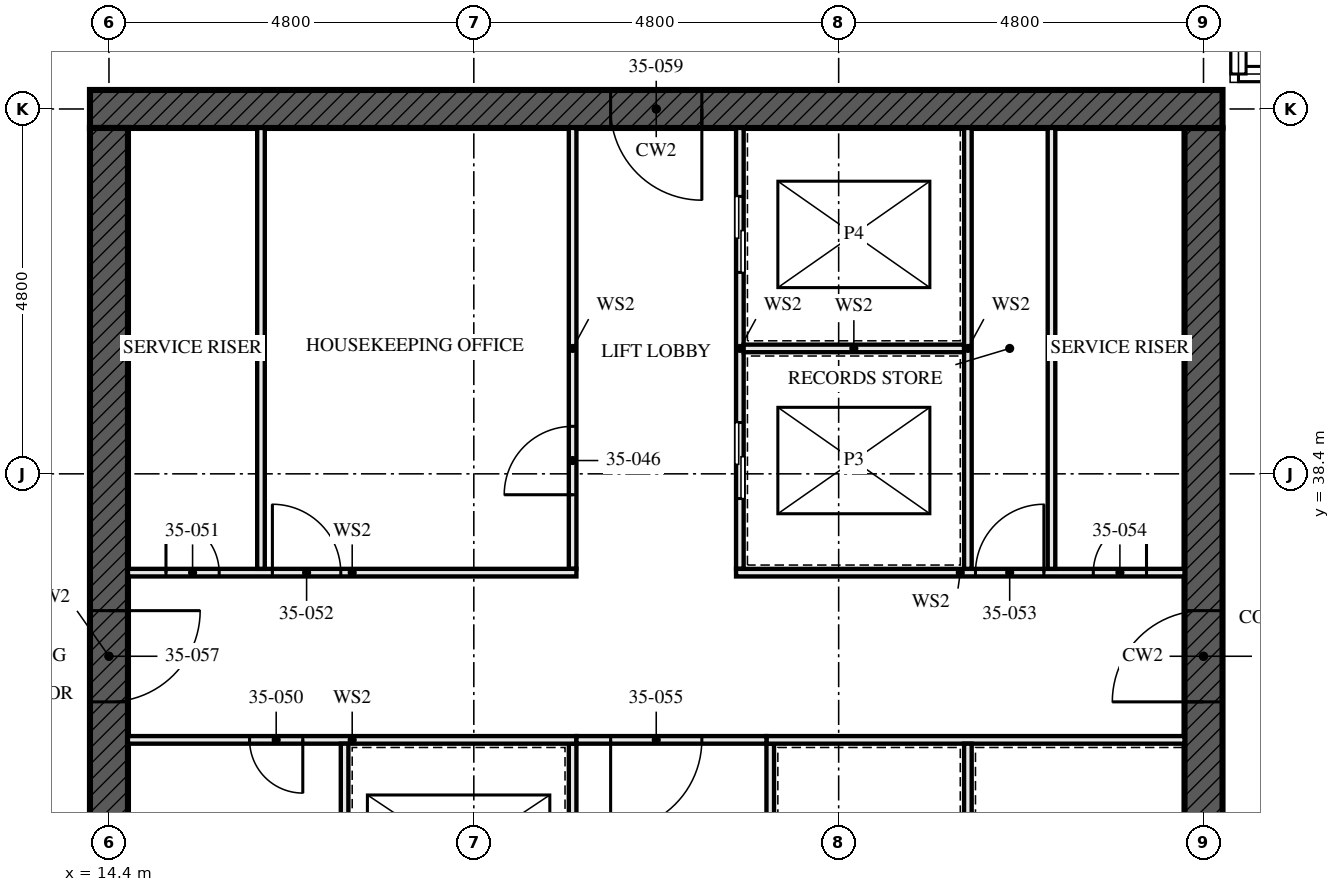
"""IFC4 building model, lengths in metres.
Left out: names, types, materials, properties, quantities, classifications, styles, units other than length and angle.
Written with IfcOpenShell. Run it as: python <this file> out.ifc"""

import sys

from ifc_helpers import new_model, si_unit, direction, frame, frame_2d, origin, place, context, subcontext, project, spatial, rectangle, extrude, element, fill, save


model = new_model("IFC4")
c1 = context("Model", 3, precision=1e-05, world=origin(), true_north=direction((0.0, 1.0)))
c2 = subcontext(c1, "Body", "Model", "MODEL_VIEW")
j1 = project(units=[si_unit("LENGTHUNIT", "METRE"), si_unit("PLANEANGLEUNIT", "RADIAN")], contexts=[c1])
p1 = place(None, origin())
s1 = spatial("IfcSite", under=j1, at=p1, CompositionType="ELEMENT")
p2 = place(p1, origin())
s2 = spatial("IfcBuilding", under=s1, at=p2, CompositionType="ELEMENT")
p3 = place(p2, frame((0.0, 0.0, 129.5)))
s3 = spatial("IfcBuildingStorey", under=s2, at=p3, CompositionType="ELEMENT", Elevation=129.5)
p4 = place(p3, frame((29.05, 43.2, -0.17), z_axis=(0.0, 0.0, 1.0), x_axis=(-1.0, 0.0, 0.0)))
e1 = element("IfcWall", 1, at=p4, inside=s3, PredefinedType="SHEAR", context=c2, shape_type="SweptSolid", body=[
    extrude(rectangle(XDim=14.9, YDim=0.5, at=frame_2d((7.45, 0.0))), origin(), (0.0, 0.0, 1.0), 3.5),
])
p5 = place(p4, frame((6.85, 0.0, 0.17)))
e2 = element("IfcOpeningElement", 2, at=p5, cuts=e1, PredefinedType="OPENING", context=c2, shape_type="SweptSolid", body=[
    extrude(rectangle(XDim=1.2, YDim=2.1, at=frame_2d((0.6, 1.05))), frame((0.0, 0.26, 0.0), z_axis=(0.0, -1.0, 0.0), x_axis=(1.0, 0.0, 0.0)), (0.0, 0.0, 1.0), 0.521),
])
p6 = place(p3, frame((14.4, 42.95, -0.17), z_axis=(0.0, 0.0, 1.0), x_axis=(0.0, -1.0, 0.0)))
e3 = element("IfcWall", 3, at=p6, inside=s3, PredefinedType="SHEAR", context=c2, shape_type="SweptSolid", body=[
    extrude(rectangle(XDim=13.9, YDim=0.5, at=frame_2d((6.95, 0.0))), origin(), (0.0, 0.0, 1.0), 3.5),
])
p7 = place(p6, frame((6.35, 0.0, 0.17)))
e4 = element("IfcOpeningElement", 4, at=p7, cuts=e3, PredefinedType="OPENING", context=c2, shape_type="SweptSolid", body=[
    extrude(rectangle(XDim=1.2, YDim=2.1, at=frame_2d((0.6, 1.05))), frame((0.0, 0.26, 0.0), z_axis=(0.0, -1.0, 0.0), x_axis=(1.0, 0.0, 0.0)), (0.0, 0.0, 1.0), 0.521),
])
p8 = place(p3, frame((28.8, 29.05, -0.17), z_axis=(0.0, 0.0, 1.0), x_axis=(0.0, 1.0, 0.0)))
e5 = element("IfcWall", 5, at=p8, inside=s3, PredefinedType="SHEAR", context=c2, shape_type="SweptSolid", body=[
    extrude(rectangle(XDim=13.9, YDim=0.5, at=frame_2d((6.95, 0.0))), origin(), (0.0, 0.0, 1.0), 3.5),
])
p9 = place(p8, frame((6.35, 0.0, 0.17)))
e6 = element("IfcOpeningElement", 6, at=p9, cuts=e5, PredefinedType="OPENING", context=c2, shape_type="SweptSolid", body=[
    extrude(rectangle(XDim=1.2, YDim=2.1, at=frame_2d((0.6, 1.05))), frame((0.0, 0.26, 0.0), z_axis=(0.0, -1.0, 0.0), x_axis=(1.0, 0.0, 0.0)), (0.0, 0.0, 1.0), 0.521),
])
for number, where, z_axis, x_axis in (
    (7, (16.4, 37.15, 0.0), (0.0, 0.0, 1.0), (0.0, 1.0, 0.0)),
    (8, (26.8, 37.15, 0.0), (0.0, 0.0, 1.0), (0.0, 1.0, 0.0)),
):
    element("IfcWall", number, at=place(p3, frame(where, z_axis=z_axis, x_axis=x_axis)), inside=s3, PredefinedType="SOLIDWALL", context=c2, shape_type="SweptSolid", body=[
        extrude(rectangle(XDim=5.8, YDim=0.1, at=frame_2d((2.9, 0.0))), origin(), (0.0, 0.0, 1.0), 3.33),
    ])
p10 = place(p3, frame((20.5, 29.05, 0.0), z_axis=(0.0, 0.0, 1.0), x_axis=(0.0, 1.0, 0.0)))
e9 = element("IfcWall", 9, at=p10, inside=s3, PredefinedType="SOLIDWALL", context=c2, shape_type="SweptSolid", body=[
    extrude(rectangle(XDim=5.8, YDim=0.1, at=frame_2d((2.9, 0.0))), origin(), (0.0, 0.0, 1.0), 3.33),
])
p11 = place(p10, frame((0.8, 0.0, 0.0)))
e10 = element("IfcOpeningElement", 10, at=p11, cuts=e9, PredefinedType="OPENING", context=c2, shape_type="SweptSolid", body=[
    extrude(rectangle(XDim=1.1, YDim=2.3, at=frame_2d((0.55, 1.15))), frame((0.0, 0.061, 0.0), z_axis=(0.0, -1.0, 0.0), x_axis=(1.0, 0.0, 0.0)), (0.0, 0.0, 1.0), 0.121),
])
p12 = place(p10, frame((3.775, 0.0, 0.0)))
e11 = element("IfcOpeningElement", 11, at=p12, cuts=e9, PredefinedType="OPENING", context=c2, shape_type="SweptSolid", body=[
    extrude(rectangle(XDim=1.1, YDim=2.3, at=frame_2d((0.55, 1.15))), frame((0.0, 0.061, 0.0), z_axis=(0.0, -1.0, 0.0), x_axis=(1.0, 0.0, 0.0)), (0.0, 0.0, 1.0), 0.121),
])
p13 = place(p3, frame((20.5, 37.15, 0.0), z_axis=(0.0, 0.0, 1.0), x_axis=(0.0, 1.0, 0.0)))
e12 = element("IfcWall", 12, at=p13, inside=s3, PredefinedType="SOLIDWALL", context=c2, shape_type="SweptSolid", body=[
    extrude(rectangle(XDim=5.8, YDim=0.1, at=frame_2d((2.9, 0.0))), origin(), (0.0, 0.0, 1.0), 3.33),
])
p14 = place(p13, frame((0.975, 0.0, 0.0)))
e13 = element("IfcOpeningElement", 13, at=p14, cuts=e12, PredefinedType="OPENING", context=c2, shape_type="SweptSolid", body=[
    extrude(rectangle(XDim=0.9, YDim=2.1, at=frame_2d((0.45, 1.05))), frame((0.0, 0.061, 0.0), z_axis=(0.0, -1.0, 0.0), x_axis=(1.0, 0.0, 0.0)), (0.0, 0.0, 1.0), 0.121),
])
p15 = place(p3, frame((22.7, 37.15, 0.0), z_axis=(0.0, 0.0, 1.0), x_axis=(0.0, 1.0, 0.0)))
e14 = element("IfcWall", 14, at=p15, inside=s3, PredefinedType="SOLIDWALL", context=c2, shape_type="SweptSolid", body=[
    extrude(rectangle(XDim=5.8, YDim=0.1, at=frame_2d((2.9, 0.0))), origin(), (0.0, 0.0, 1.0), 3.33),
])
p16 = place(p15, frame((0.925, 0.0, 0.0)))
e15 = element("IfcOpeningElement", 15, at=p16, cuts=e14, PredefinedType="OPENING", context=c2, shape_type="SweptSolid", body=[
    extrude(rectangle(XDim=1.0, YDim=2.1, at=frame_2d((0.5, 1.05))), frame((0.0, 0.061, 0.0), z_axis=(0.0, -1.0, 0.0), x_axis=(1.0, 0.0, 0.0)), (0.0, 0.0, 1.0), 0.121),
])
p17 = place(p15, frame((3.9, 0.0, 0.0)))
e16 = element("IfcOpeningElement", 16, at=p17, cuts=e14, PredefinedType="OPENING", context=c2, shape_type="SweptSolid", body=[
    extrude(rectangle(XDim=1.0, YDim=2.1, at=frame_2d((0.5, 1.05))), frame((0.0, 0.061, 0.0), z_axis=(0.0, -1.0, 0.0), x_axis=(1.0, 0.0, 0.0)), (0.0, 0.0, 1.0), 0.121),
])
p18 = place(p3, frame((23.1, 29.05, 0.0), z_axis=(0.0, 0.0, 1.0), x_axis=(0.0, 1.0, 0.0)))
e17 = element("IfcWall", 17, at=p18, inside=s3, PredefinedType="SOLIDWALL", context=c2, shape_type="SweptSolid", body=[
    extrude(rectangle(XDim=5.8, YDim=0.1, at=frame_2d((2.9, 0.0))), origin(), (0.0, 0.0, 1.0), 3.33),
])
p19 = place(p18, frame((1.0, 0.0, 0.0)))
e18 = element("IfcOpeningElement", 18, at=p19, cuts=e17, PredefinedType="OPENING", context=c2, shape_type="SweptSolid", body=[
    extrude(rectangle(XDim=0.7, YDim=2.1, at=frame_2d((0.35, 1.05))), frame((0.0, 0.061, 0.0), z_axis=(0.0, -1.0, 0.0), x_axis=(1.0, 0.0, 0.0)), (0.0, 0.0, 1.0), 0.121),
])
p20 = place(p3, frame((14.65, 34.9, 0.0), z_axis=(0.0, 0.0, 1.0), x_axis=(1.0, 0.0, 0.0)))
e19 = element("IfcWall", 19, at=p20, inside=s3, PredefinedType="SOLIDWALL", context=c2, shape_type="SweptSolid", body=[
    extrude(rectangle(XDim=5.9, YDim=0.1, at=frame_2d((2.95, 0.0))), origin(), (0.0, 0.0, 1.0), 3.33),
])
p21 = place(p20, frame((1.6, 0.0, 0.0)))
e20 = element("IfcOpeningElement", 20, at=p21, cuts=e19, PredefinedType="OPENING", context=c2, shape_type="SweptSolid", body=[
    extrude(rectangle(XDim=0.7, YDim=2.1, at=frame_2d((0.35, 1.05))), frame((0.0, 0.061, 0.0), z_axis=(0.0, -1.0, 0.0), x_axis=(1.0, 0.0, 0.0)), (0.0, 0.0, 1.0), 0.121),
])
p22 = place(p3, frame((23.05, 34.9, 0.0), z_axis=(0.0, 0.0, 1.0), x_axis=(1.0, 0.0, 0.0)))
e21 = element("IfcWall", 21, at=p22, inside=s3, PredefinedType="SOLIDWALL", context=c2, shape_type="SweptSolid", body=[
    extrude(rectangle(XDim=5.5, YDim=0.1, at=frame_2d((2.75, 0.0))), origin(), (0.0, 0.0, 1.0), 3.33),
])
p23 = place(p3, frame((14.65, 37.1, 0.0), z_axis=(0.0, 0.0, 1.0), x_axis=(1.0, 0.0, 0.0)))
e22 = element("IfcWall", 22, at=p23, inside=s3, PredefinedType="SOLIDWALL", context=c2, shape_type="SweptSolid", body=[
    extrude(rectangle(XDim=5.9, YDim=0.1, at=frame_2d((2.95, 0.0))), origin(), (0.0, 0.0, 1.0), 3.33),
])
p24 = place(p23, frame((0.5, 0.0, 0.0)))
e23 = element("IfcOpeningElement", 23, at=p24, cuts=e22, PredefinedType="OPENING", context=c2, shape_type="SweptSolid", body=[
    extrude(rectangle(XDim=0.7, YDim=2.1, at=frame_2d((0.35, 1.05))), frame((0.0, 0.061, 0.0), z_axis=(0.0, -1.0, 0.0), x_axis=(1.0, 0.0, 0.0)), (0.0, 0.0, 1.0), 0.121),
])
p25 = place(p23, frame((1.9, 0.0, 0.0)))
e24 = element("IfcOpeningElement", 24, at=p25, cuts=e22, PredefinedType="OPENING", context=c2, shape_type="SweptSolid", body=[
    extrude(rectangle(XDim=0.9, YDim=2.1, at=frame_2d((0.45, 1.05))), frame((0.0, 0.061, 0.0), z_axis=(0.0, -1.0, 0.0), x_axis=(1.0, 0.0, 0.0)), (0.0, 0.0, 1.0), 0.121),
])
p26 = place(p3, frame((22.65, 37.1, 0.0), z_axis=(0.0, 0.0, 1.0), x_axis=(1.0, 0.0, 0.0)))
e25 = element("IfcWall", 25, at=p26, inside=s3, PredefinedType="SOLIDWALL", context=c2, shape_type="SweptSolid", body=[
    extrude(rectangle(XDim=5.9, YDim=0.1, at=frame_2d((2.95, 0.0))), origin(), (0.0, 0.0, 1.0), 3.33),
])
p27 = place(p26, frame((3.15, 0.0, 0.0)))
e26 = element("IfcOpeningElement", 26, at=p27, cuts=e25, PredefinedType="OPENING", context=c2, shape_type="SweptSolid", body=[
    extrude(rectangle(XDim=0.9, YDim=2.1, at=frame_2d((0.45, 1.05))), frame((0.0, 0.061, 0.0), z_axis=(0.0, -1.0, 0.0), x_axis=(1.0, 0.0, 0.0)), (0.0, 0.0, 1.0), 0.121),
])
p28 = place(p26, frame((4.7, 0.0, 0.0)))
e27 = element("IfcOpeningElement", 27, at=p28, cuts=e25, PredefinedType="OPENING", context=c2, shape_type="SweptSolid", body=[
    extrude(rectangle(XDim=0.7, YDim=2.1, at=frame_2d((0.35, 1.05))), frame((0.0, 0.061, 0.0), z_axis=(0.0, -1.0, 0.0), x_axis=(1.0, 0.0, 0.0)), (0.0, 0.0, 1.0), 0.121),
])
p29 = place(p3, frame((20.55, 34.9, 0.0), z_axis=(0.0, 0.0, 1.0), x_axis=(1.0, 0.0, 0.0)))
e28 = element("IfcWall", 28, at=p29, inside=s3, PredefinedType="SOLIDWALL", context=c2, shape_type="SweptSolid", body=[
    extrude(rectangle(XDim=2.5, YDim=0.1, at=frame_2d((1.25, 0.0))), origin(), (0.0, 0.0, 1.0), 3.33),
])
p30 = place(p29, frame((0.45, 0.0, 0.0)))
e29 = element("IfcOpeningElement", 29, at=p30, cuts=e28, PredefinedType="OPENING", context=c2, shape_type="SweptSolid", body=[
    extrude(rectangle(XDim=1.2, YDim=2.1, at=frame_2d((0.6, 1.05))), frame((0.0, 0.061, 0.0), z_axis=(0.0, -1.0, 0.0), x_axis=(1.0, 0.0, 0.0)), (0.0, 0.0, 1.0), 0.121),
])
p31 = place(p3, frame((17.5, 29.05, 0.0), z_axis=(0.0, 0.0, 1.0), x_axis=(0.0, 1.0, 0.0)))
e30 = element("IfcWall", 30, at=p31, inside=s3, PredefinedType="SOLIDWALL", context=c2, shape_type="SweptSolid", body=[
    extrude(rectangle(XDim=5.8, YDim=0.1, at=frame_2d((2.9, 0.0))), origin(), (0.0, 0.0, 1.0), 3.33),
])
p32 = place(p3, frame((22.75, 40.05, 0.0), z_axis=(0.0, 0.0, 1.0), x_axis=(1.0, 0.0, 0.0)))
e31 = element("IfcWall", 31, at=p32, inside=s3, PredefinedType="SOLIDWALL", context=c2, shape_type="SweptSolid", body=[
    extrude(rectangle(XDim=2.9, YDim=0.1, at=frame_2d((1.45, 0.0))), origin(), (0.0, 0.0, 1.0), 3.33),
])
p33 = place(p3, frame((25.7, 37.15, 0.0), z_axis=(0.0, 0.0, 1.0), x_axis=(0.0, 1.0, 0.0)))
e32 = element("IfcWall", 32, at=p33, inside=s3, PredefinedType="SOLIDWALL", context=c2, shape_type="SweptSolid", body=[
    extrude(rectangle(XDim=5.8, YDim=0.1, at=frame_2d((2.9, 0.0))), origin(), (0.0, 0.0, 1.0), 3.33),
])
p34 = place(p3, frame((25.7, 31.95, 0.0), z_axis=(0.0, 0.0, 1.0), x_axis=(0.0, 1.0, 0.0)))
e33 = element("IfcWall", 33, at=p34, inside=s3, PredefinedType="SOLIDWALL", context=c2, shape_type="SweptSolid", body=[
    extrude(rectangle(XDim=2.9, YDim=0.1, at=frame_2d((1.45, 0.0))), origin(), (0.0, 0.0, 1.0), 3.33),
])
p35 = place(p14, origin())
e34 = element("IfcDoor", 34, at=p35, inside=s3, OperationType="SINGLE_SWING_RIGHT", PredefinedType="DOOR", context=c2, shape_type="SweptSolid", body=[
    extrude(rectangle(XDim=0.9, YDim=2.1, at=frame_2d((0.45, 1.05))), frame((0.0, 0.027, 0.0), z_axis=(0.0, -1.0, 0.0), x_axis=(1.0, 0.0, 0.0)), (0.0, 0.0, 1.0), 0.054),
])
fill(e13, e34)
p36 = place(p16, origin())
e35 = element("IfcDoor", 35, at=p36, inside=s3, OperationType="SLIDING_TO_LEFT", PredefinedType="DOOR", context=c2, shape_type="SweptSolid", body=[
    extrude(rectangle(XDim=1.0, YDim=2.1, at=frame_2d((0.5, 1.05))), frame((0.0, 0.05, 0.0), z_axis=(0.0, -1.0, 0.0), x_axis=(1.0, 0.0, 0.0)), (0.0, 0.0, 1.0), 0.1),
])
fill(e15, e35)
p37 = place(p17, origin())
e36 = element("IfcDoor", 36, at=p37, inside=s3, OperationType="SLIDING_TO_LEFT", PredefinedType="DOOR", context=c2, shape_type="SweptSolid", body=[
    extrude(rectangle(XDim=1.0, YDim=2.1, at=frame_2d((0.5, 1.05))), frame((0.0, 0.05, 0.0), z_axis=(0.0, -1.0, 0.0), x_axis=(1.0, 0.0, 0.0)), (0.0, 0.0, 1.0), 0.1),
])
fill(e16, e36)
p38 = place(p21, frame((0.7, 0.0, 0.0), z_axis=(0.0, 0.0, 1.0), x_axis=(-1.0, 0.0, 0.0)))
e37 = element("IfcDoor", 37, at=p38, inside=s3, OperationType="SINGLE_SWING_RIGHT", PredefinedType="DOOR", context=c2, shape_type="SweptSolid", body=[
    extrude(rectangle(XDim=0.7, YDim=2.1, at=frame_2d((0.35, 1.05))), frame((0.0, 0.027, 0.0), z_axis=(0.0, -1.0, 0.0), x_axis=(1.0, 0.0, 0.0)), (0.0, 0.0, 1.0), 0.054),
])
fill(e20, e37)
p39 = place(p24, origin())
e38 = element("IfcDoor", 38, at=p39, inside=s3, OperationType="SINGLE_SWING_RIGHT", PredefinedType="DOOR", context=c2, shape_type="SweptSolid", body=[
    extrude(rectangle(XDim=0.7, YDim=2.1, at=frame_2d((0.35, 1.05))), frame((0.0, 0.027, 0.0), z_axis=(0.0, -1.0, 0.0), x_axis=(1.0, 0.0, 0.0)), (0.0, 0.0, 1.0), 0.054),
])
fill(e23, e38)
p40 = place(p25, origin())
e39 = element("IfcDoor", 39, at=p40, inside=s3, OperationType="SINGLE_SWING_RIGHT", PredefinedType="DOOR", context=c2, shape_type="SweptSolid", body=[
    extrude(rectangle(XDim=0.9, YDim=2.1, at=frame_2d((0.45, 1.05))), frame((0.0, 0.027, 0.0), z_axis=(0.0, -1.0, 0.0), x_axis=(1.0, 0.0, 0.0)), (0.0, 0.0, 1.0), 0.054),
])
fill(e24, e39)
p41 = place(p27, origin())
e40 = element("IfcDoor", 40, at=p41, inside=s3, OperationType="SINGLE_SWING_LEFT", PredefinedType="DOOR", context=c2, shape_type="SweptSolid", body=[
    extrude(rectangle(XDim=0.9, YDim=2.1, at=frame_2d((0.45, 1.05))), frame((0.0, 0.027, 0.0), z_axis=(0.0, -1.0, 0.0), x_axis=(1.0, 0.0, 0.0)), (0.0, 0.0, 1.0), 0.054),
])
fill(e26, e40)
p42 = place(p28, origin())
e41 = element("IfcDoor", 41, at=p42, inside=s3, OperationType="SINGLE_SWING_LEFT", PredefinedType="DOOR", context=c2, shape_type="SweptSolid", body=[
    extrude(rectangle(XDim=0.7, YDim=2.1, at=frame_2d((0.35, 1.05))), frame((0.0, 0.027, 0.0), z_axis=(0.0, -1.0, 0.0), x_axis=(1.0, 0.0, 0.0)), (0.0, 0.0, 1.0), 0.054),
])
fill(e27, e41)
p43 = place(p30, frame((1.2, 0.0, 0.0), z_axis=(0.0, 0.0, 1.0), x_axis=(-1.0, 0.0, 0.0)))
e42 = element("IfcDoor", 42, at=p43, inside=s3, OperationType="SINGLE_SWING_LEFT", PredefinedType="DOOR", context=c2, shape_type="SweptSolid", body=[
    extrude(rectangle(XDim=1.2, YDim=2.1, at=frame_2d((0.6, 1.05))), frame((0.0, 0.027, 0.0), z_axis=(0.0, -1.0, 0.0), x_axis=(1.0, 0.0, 0.0)), (0.0, 0.0, 1.0), 0.054),
])
fill(e29, e42)
p44 = place(p7, origin())
e43 = element("IfcDoor", 43, at=p44, inside=s3, OperationType="SINGLE_SWING_LEFT", PredefinedType="DOOR", context=c2, shape_type="SweptSolid", body=[
    extrude(rectangle(XDim=1.2, YDim=2.1, at=frame_2d((0.6, 1.05))), frame((0.0, 0.027, 0.0), z_axis=(0.0, -1.0, 0.0), x_axis=(1.0, 0.0, 0.0)), (0.0, 0.0, 1.0), 0.054),
])
fill(e4, e43)
p45 = place(p9, origin())
e44 = element("IfcDoor", 44, at=p45, inside=s3, OperationType="SINGLE_SWING_LEFT", PredefinedType="DOOR", context=c2, shape_type="SweptSolid", body=[
    extrude(rectangle(XDim=1.2, YDim=2.1, at=frame_2d((0.6, 1.05))), frame((0.0, 0.027, 0.0), z_axis=(0.0, -1.0, 0.0), x_axis=(1.0, 0.0, 0.0)), (0.0, 0.0, 1.0), 0.054),
])
fill(e6, e44)
p46 = place(p5, origin())
e45 = element("IfcDoor", 45, at=p46, inside=s3, OperationType="SINGLE_SWING_LEFT", PredefinedType="DOOR", context=c2, shape_type="SweptSolid", body=[
    extrude(rectangle(XDim=1.2, YDim=2.1, at=frame_2d((0.6, 1.05))), frame((0.0, 0.027, 0.0), z_axis=(0.0, -1.0, 0.0), x_axis=(1.0, 0.0, 0.0)), (0.0, 0.0, 1.0), 0.054),
])
fill(e2, e45)
save(model, sys.argv[1])
